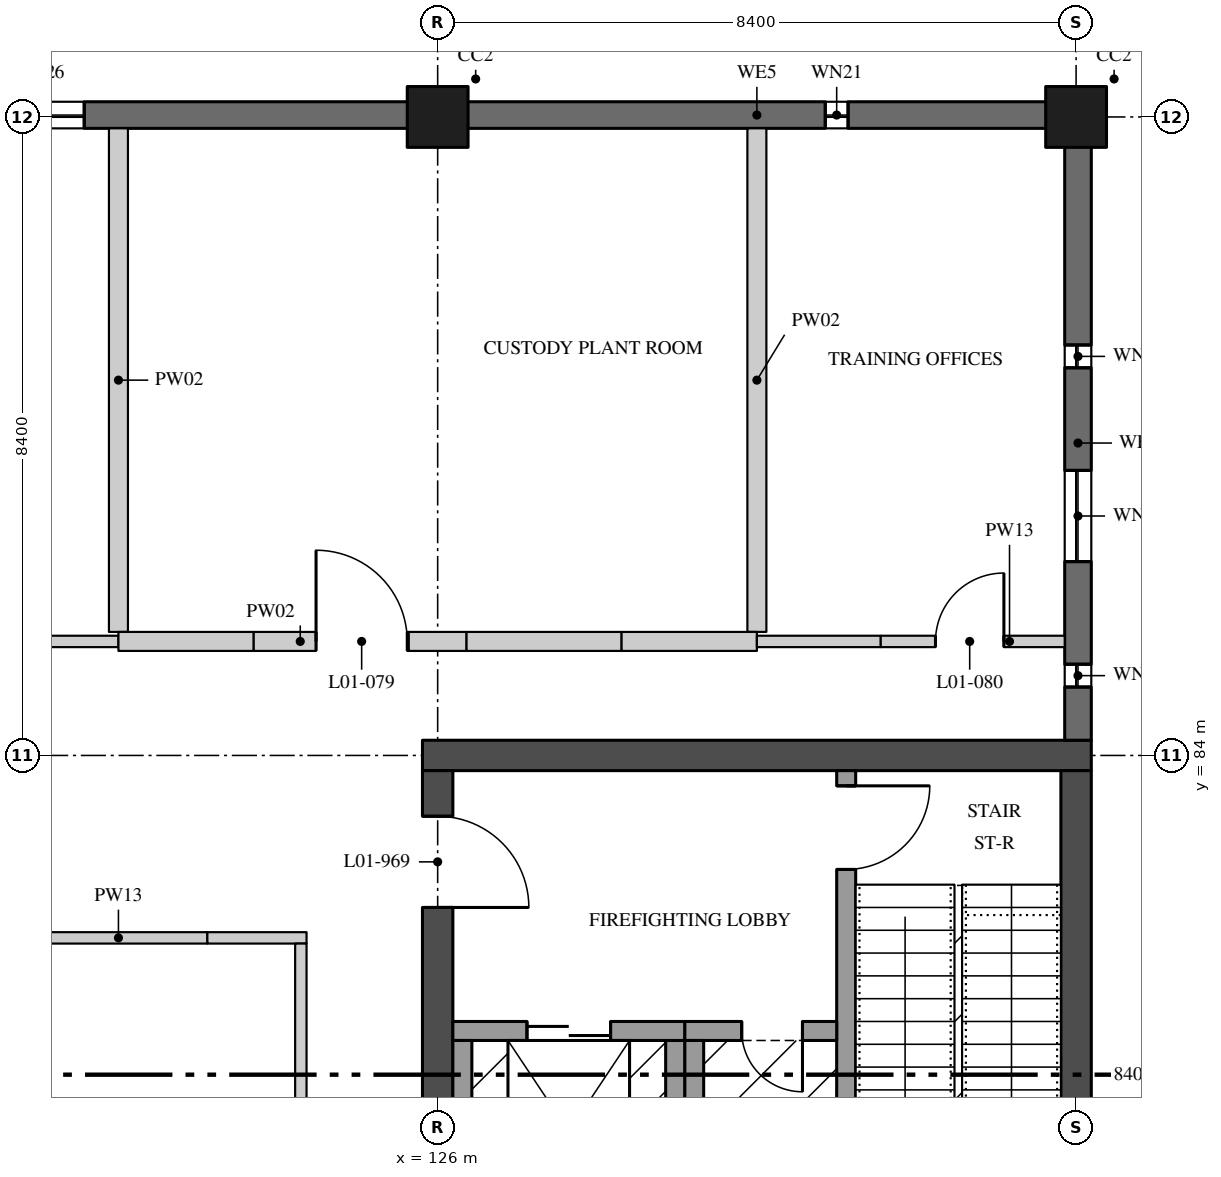
"""IFC4 building model, lengths in metres.
Left out: names, types, materials, properties, quantities, classifications, styles, units other than length and angle.
Written with IfcOpenShell. Run it as: python <this file> out.ifc"""

import sys

from ifc_helpers import new_model, si_unit, direction, frame, frame_2d, origin, origin_2d, place, context, subcontext, project, spatial, rectangle, extrude, element, fill, save


model = new_model("IFC4")
c1 = context("Model", 3, precision=1e-05, world=origin(), true_north=direction((0.0, 1.0)))
c2 = subcontext(c1, "Body", "Model", "MODEL_VIEW")
j1 = project(units=[si_unit("LENGTHUNIT", "METRE"), si_unit("PLANEANGLEUNIT", "RADIAN")], contexts=[c1])
p1 = place(None, origin())
s1 = spatial("IfcSite", under=j1, at=p1, CompositionType="ELEMENT")
p2 = place(p1, origin())
s2 = spatial("IfcBuilding", under=s1, at=p2, CompositionType="ELEMENT")
p3 = place(p2, frame((0.0, 0.0, 5.4)))
s3 = spatial("IfcBuildingStorey", under=s2, at=p3, CompositionType="ELEMENT", Elevation=5.4)
for number, where, z_axis, x_axis in (
    (1, (126.0, 92.4, 0.0), (0.0, 0.0, 1.0), (1.0, 0.0, 0.0)),
    (2, (134.4, 92.4, 0.0), (0.0, 0.0, 1.0), (1.0, 0.0, 0.0)),
):
    element("IfcColumn", number, at=place(p3, frame(where, z_axis=z_axis, x_axis=x_axis)), inside=s3, PredefinedType="COLUMN", context=c2, shape_type="SweptSolid", body=[
        extrude(rectangle(XDim=0.8, YDim=0.8, at=origin_2d()), origin(), (0.0, 0.0, 1.0), 4.37),
    ])
p4 = place(p3, frame((125.8, 84.0, 0.0), z_axis=(0.0, 0.0, 1.0), x_axis=(1.0, 0.0, 0.0)))
e3 = element("IfcWall", 3, at=p4, inside=s3, PredefinedType="SHEAR", context=c2, shape_type="SweptSolid", body=[
    extrude(rectangle(XDim=8.8, YDim=0.4, at=frame_2d((4.4, 0.0))), origin(), (0.0, 0.0, 1.0), 4.37),
])
p5 = place(p3, frame((126.0, 75.8, 0.0), z_axis=(0.0, 0.0, 1.0), x_axis=(0.0, 1.0, 0.0)))
e4 = element("IfcWall", 4, at=p5, inside=s3, PredefinedType="SHEAR", context=c2, shape_type="SweptSolid", body=[
    extrude(rectangle(XDim=8.0, YDim=0.4, at=frame_2d((4.0, 0.0))), origin(), (0.0, 0.0, 1.0), 4.37),
])
p6 = place(p5, frame((6.2, 0.0, 0.0)))
e5 = element("IfcOpeningElement", 5, at=p6, cuts=e4, PredefinedType="OPENING", context=c2, shape_type="SweptSolid", body=[
    extrude(rectangle(XDim=1.2, YDim=2.1, at=frame_2d((0.6, 1.05))), frame((0.0, 0.21, 0.0), z_axis=(0.0, -1.0, 0.0), x_axis=(1.0, 0.0, 0.0)), (0.0, 0.0, 1.0), 0.42),
])
p7 = place(p3, frame((134.4, 75.8, 0.0), z_axis=(0.0, 0.0, 1.0), x_axis=(0.0, 1.0, 0.0)))
e6 = element("IfcWall", 6, at=p7, inside=s3, PredefinedType="SHEAR", context=c2, shape_type="SweptSolid", body=[
    extrude(rectangle(XDim=8.0, YDim=0.4, at=frame_2d((4.0, 0.0))), origin(), (0.0, 0.0, 1.0), 4.37),
])
p8 = place(p3, frame((131.375, 83.8, 0.0), z_axis=(0.0, 0.0, 1.0), x_axis=(0.0, -1.0, 0.0)))
e7 = element("IfcWall", 7, at=p8, inside=s3, PredefinedType="SOLIDWALL", context=c2, shape_type="SweptSolid", body=[
    extrude(rectangle(XDim=8.0, YDim=0.25, at=frame_2d((4.0, 0.0))), origin(), (0.0, 0.0, 1.0), 4.37),
])
p9 = place(p8, frame((0.2, 0.0, 0.0)))
e8 = element("IfcOpeningElement", 8, at=p9, cuts=e7, PredefinedType="OPENING", context=c2, shape_type="SweptSolid", body=[
    extrude(rectangle(XDim=1.1, YDim=2.1, at=frame_2d((0.55, 1.05))), frame((0.0, 0.135, 0.0), z_axis=(0.0, -1.0, 0.0), x_axis=(1.0, 0.0, 0.0)), (0.0, 0.0, 1.0), 0.27),
])
p10 = place(p3, frame((131.25, 80.375, 0.0), z_axis=(0.0, 0.0, 1.0), x_axis=(-1.0, 0.0, 0.0)))
e9 = element("IfcWall", 9, at=p10, inside=s3, PredefinedType="SOLIDWALL", context=c2, shape_type="SweptSolid", body=[
    extrude(rectangle(XDim=2.0, YDim=0.25, at=frame_2d((1.0, 0.0))), origin(), (0.0, 0.0, 1.0), 4.37),
])
p11 = place(p10, frame((0.45, 0.0, 0.0)))
e10 = element("IfcOpeningElement", 10, at=p11, cuts=e9, PredefinedType="OPENING", context=c2, shape_type="SweptSolid", body=[
    extrude(rectangle(XDim=0.8, YDim=2.1, at=frame_2d((0.4, 1.05))), frame((0.0, 0.135, 0.0), z_axis=(0.0, -1.0, 0.0), x_axis=(1.0, 0.0, 0.0)), (0.0, 0.0, 1.0), 0.27),
])
p12 = place(p3, frame((129.375, 80.25, 0.0), z_axis=(0.0, 0.0, 1.0), x_axis=(0.0, -1.0, 0.0)))
e11 = element("IfcWall", 11, at=p12, inside=s3, PredefinedType="SOLIDWALL", context=c2, shape_type="SweptSolid", body=[
    extrude(rectangle(XDim=2.85, YDim=0.25, at=frame_2d((1.425, 0.0))), origin(), (0.0, 0.0, 1.0), 4.37),
])
p13 = place(p3, frame((129.125, 77.65, 0.0), z_axis=(0.0, 0.0, 1.0), x_axis=(0.0, 1.0, 0.0)))
e12 = element("IfcWall", 12, at=p13, inside=s3, PredefinedType="SOLIDWALL", context=c2, shape_type="SweptSolid", body=[
    extrude(rectangle(XDim=2.6, YDim=0.25, at=frame_2d((1.3, 0.0))), origin(), (0.0, 0.0, 1.0), 4.37),
])
p14 = place(p3, frame((126.2, 80.375, 0.0), z_axis=(0.0, 0.0, 1.0), x_axis=(1.0, 0.0, 0.0)))
e13 = element("IfcWall", 13, at=p14, inside=s3, PredefinedType="SOLIDWALL", context=c2, shape_type="SweptSolid", body=[
    extrude(rectangle(XDim=3.05, YDim=0.25, at=frame_2d((1.525, 0.0))), origin(), (0.0, 0.0, 1.0), 4.37),
])
p15 = place(p14, frame((0.975, 0.0, 0.0)))
e14 = element("IfcOpeningElement", 14, at=p15, cuts=e13, PredefinedType="OPENING", context=c2, shape_type="SweptSolid", body=[
    extrude(rectangle(XDim=1.1, YDim=2.1, at=frame_2d((0.55, 1.05))), frame((0.0, 0.135, 0.0), z_axis=(0.0, -1.0, 0.0), x_axis=(1.0, 0.0, 0.0)), (0.0, 0.0, 1.0), 0.27),
])
p16 = place(p3, frame((126.325, 77.65, 0.0), z_axis=(0.0, 0.0, 1.0), x_axis=(0.0, 1.0, 0.0)))
e15 = element("IfcWall", 15, at=p16, inside=s3, PredefinedType="SOLIDWALL", context=c2, shape_type="SweptSolid", body=[
    extrude(rectangle(XDim=2.6, YDim=0.25, at=frame_2d((1.3, 0.0))), origin(), (0.0, 0.0, 1.0), 4.37),
])
p17 = place(p3, frame((120.63, 81.6, 0.0), z_axis=(0.0, 0.0, 1.0), x_axis=(1.0, 0.0, 0.0)))
e16 = element("IfcWall", 16, at=p17, inside=s3, PredefinedType="PARTITIONING", context=c2, shape_type="SweptSolid", body=[
    extrude(rectangle(XDim=2.34, YDim=0.15, at=frame_2d((1.17, 0.0))), origin(), (0.0, 0.0, 1.0), 4.37),
])
p18 = place(p3, frame((122.97, 81.6, 0.0), z_axis=(0.0, 0.0, 1.0), x_axis=(1.0, 0.0, 0.0)))
e17 = element("IfcWall", 17, at=p18, inside=s3, PredefinedType="PARTITIONING", context=c2, shape_type="SweptSolid", body=[
    extrude(rectangle(XDim=1.305, YDim=0.15, at=frame_2d((0.652, 0.0))), origin(), (0.0, 0.0, 1.0), 3.895),
])
p19 = place(p3, frame((124.2, 76.135, 0.0), z_axis=(0.0, 0.0, 1.0), x_axis=(0.0, 1.0, 0.0)))
e18 = element("IfcWall", 18, at=p19, inside=s3, PredefinedType="PARTITIONING", context=c2, shape_type="SweptSolid", body=[
    extrude(rectangle(XDim=5.39, YDim=0.15, at=frame_2d((2.695, 0.0))), origin(), (0.0, 0.0, 1.0), 4.37),
])
p20 = place(p19, frame((2.04, 0.0, 0.0)))
e19 = element("IfcOpeningElement", 19, at=p20, cuts=e18, PredefinedType="OPENING", context=c2, shape_type="SweptSolid", body=[
    extrude(rectangle(XDim=0.9, YDim=2.1, at=frame_2d((0.45, 1.05))), frame((0.0, 0.085, 0.0), z_axis=(0.0, -1.0, 0.0), x_axis=(1.0, 0.0, 0.0)), (0.0, 0.0, 1.0), 0.17),
])
p21 = place(p3, frame((121.8, 85.625, 0.0), z_axis=(0.0, 0.0, 1.0), x_axis=(0.0, 1.0, 0.0)))
e20 = element("IfcWall", 20, at=p21, inside=s3, PredefinedType="PARTITIONING", context=c2, shape_type="SweptSolid", body=[
    extrude(rectangle(XDim=6.625, YDim=0.25, at=frame_2d((3.312, 0.0))), origin(), (0.0, 0.0, 1.0), 4.37),
])
p22 = place(p3, frame((120.17, 85.5, 0.0), z_axis=(0.0, 0.0, 1.0), x_axis=(1.0, 0.0, 0.0)))
e21 = element("IfcWall", 21, at=p22, inside=s3, PredefinedType="PARTITIONING", context=c2, shape_type="SweptSolid", body=[
    extrude(rectangle(XDim=1.63, YDim=0.15, at=frame_2d((0.815, 0.0))), origin(), (0.0, 0.0, 1.0), 3.895),
])
p23 = place(p3, frame((130.2, 85.625, 0.0), z_axis=(0.0, 0.0, 1.0), x_axis=(0.0, 1.0, 0.0)))
e22 = element("IfcWall", 22, at=p23, inside=s3, PredefinedType="PARTITIONING", context=c2, shape_type="SweptSolid", body=[
    extrude(rectangle(XDim=6.625, YDim=0.25, at=frame_2d((3.312, 0.0))), origin(), (0.0, 0.0, 1.0), 4.37),
])
p24 = place(p3, frame((121.8, 85.5, 0.0), z_axis=(0.0, 0.0, 1.0), x_axis=(1.0, 0.0, 0.0)))
e23 = element("IfcWall", 23, at=p24, inside=s3, PredefinedType="PARTITIONING", context=c2, shape_type="SweptSolid", body=[
    extrude(rectangle(XDim=1.78, YDim=0.25, at=frame_2d((0.89, 0.0))), origin(), (0.0, 0.0, 1.0), 3.895),
])
p25 = place(p3, frame((123.58, 85.5, 0.0), z_axis=(0.0, 0.0, 1.0), x_axis=(1.0, 0.0, 0.0)))
e24 = element("IfcWall", 24, at=p25, inside=s3, PredefinedType="PARTITIONING", context=c2, shape_type="SweptSolid", body=[
    extrude(rectangle(XDim=2.04, YDim=0.25, at=frame_2d((1.02, 0.0))), origin(), (0.0, 0.0, 1.0), 4.37),
])
p26 = place(p25, frame((0.82, 0.0, 0.0)))
e25 = element("IfcOpeningElement", 25, at=p26, cuts=e24, PredefinedType="OPENING", context=c2, shape_type="SweptSolid", body=[
    extrude(rectangle(XDim=1.2, YDim=2.4, at=frame_2d((0.6, 1.2))), frame((0.0, 0.135, 0.0), z_axis=(0.0, -1.0, 0.0), x_axis=(1.0, 0.0, 0.0)), (0.0, 0.0, 1.0), 0.27),
])
p27 = place(p3, frame((125.62, 85.5, 0.0), z_axis=(0.0, 0.0, 1.0), x_axis=(1.0, 0.0, 0.0)))
e26 = element("IfcWall", 26, at=p27, inside=s3, PredefinedType="PARTITIONING", context=c2, shape_type="SweptSolid", body=[
    extrude(rectangle(XDim=0.76, YDim=0.25, at=frame_2d((0.38, 0.0))), origin(), (0.0, 0.0, 1.0), 3.746),
])
p28 = place(p3, frame((126.38, 85.5, 0.0), z_axis=(0.0, 0.0, 1.0), x_axis=(1.0, 0.0, 0.0)))
e27 = element("IfcWall", 27, at=p28, inside=s3, PredefinedType="PARTITIONING", context=c2, shape_type="SweptSolid", body=[
    extrude(rectangle(XDim=2.04, YDim=0.25, at=frame_2d((1.02, 0.0))), origin(), (0.0, 0.0, 1.0), 4.37),
])
p29 = place(p3, frame((128.42, 85.5, 0.0), z_axis=(0.0, 0.0, 1.0), x_axis=(1.0, 0.0, 0.0)))
e28 = element("IfcWall", 28, at=p29, inside=s3, PredefinedType="PARTITIONING", context=c2, shape_type="SweptSolid", body=[
    extrude(rectangle(XDim=1.78, YDim=0.25, at=frame_2d((0.89, 0.0))), origin(), (0.0, 0.0, 1.0), 3.895),
])
p30 = place(p3, frame((130.2, 85.5, 0.0), z_axis=(0.0, 0.0, 1.0), x_axis=(1.0, 0.0, 0.0)))
e29 = element("IfcWall", 29, at=p30, inside=s3, PredefinedType="PARTITIONING", context=c2, shape_type="SweptSolid", body=[
    extrude(rectangle(XDim=1.63, YDim=0.15, at=frame_2d((0.815, 0.0))), origin(), (0.0, 0.0, 1.0), 3.895),
])
p31 = place(p3, frame((131.83, 85.5, 0.0), z_axis=(0.0, 0.0, 1.0), x_axis=(1.0, 0.0, 0.0)))
e30 = element("IfcWall", 30, at=p31, inside=s3, PredefinedType="PARTITIONING", context=c2, shape_type="SweptSolid", body=[
    extrude(rectangle(XDim=2.42, YDim=0.15, at=frame_2d((1.21, 0.0))), origin(), (0.0, 0.0, 1.0), 4.37),
])
p32 = place(p31, frame((0.72, 0.0, 0.0)))
e31 = element("IfcOpeningElement", 31, at=p32, cuts=e30, PredefinedType="OPENING", context=c2, shape_type="SweptSolid", body=[
    extrude(rectangle(XDim=0.9, YDim=2.1, at=frame_2d((0.45, 1.05))), frame((0.0, 0.085, 0.0), z_axis=(0.0, -1.0, 0.0), x_axis=(1.0, 0.0, 0.0)), (0.0, 0.0, 1.0), 0.17),
])
p33 = place(p3, frame((134.425, 84.2, 0.0), z_axis=(0.0, 0.0, 1.0), x_axis=(0.0, 1.0, 0.0)))
e32 = element("IfcWall", 32, at=p33, inside=s3, PredefinedType="SOLIDWALL", context=c2, shape_type="SweptSolid", body=[
    extrude(rectangle(XDim=7.82, YDim=0.35, at=frame_2d((3.91, 0.0))), origin(), (0.0, 0.0, 1.0), 3.746),
])
p34 = place(p33, frame((0.7, 0.0, 1.5)))
e33 = element("IfcOpeningElement", 33, at=p34, cuts=e32, PredefinedType="OPENING", context=c2, shape_type="SweptSolid", body=[
    extrude(rectangle(XDim=0.3, YDim=1.5, at=frame_2d((0.15, 0.75))), frame((0.0, 0.185, 0.0), z_axis=(0.0, -1.0, 0.0), x_axis=(1.0, 0.0, 0.0)), (0.0, 0.0, 1.0), 0.37),
])
p35 = place(p33, frame((2.35, 0.0, 1.5)))
e34 = element("IfcOpeningElement", 34, at=p35, cuts=e32, PredefinedType="OPENING", context=c2, shape_type="SweptSolid", body=[
    extrude(rectangle(XDim=1.2, YDim=1.65, at=frame_2d((0.6, 0.825))), frame((0.0, 0.185, 0.0), z_axis=(0.0, -1.0, 0.0), x_axis=(1.0, 0.0, 0.0)), (0.0, 0.0, 1.0), 0.37),
])
p36 = place(p33, frame((4.9, 0.0, 1.5)))
e35 = element("IfcOpeningElement", 35, at=p36, cuts=e32, PredefinedType="OPENING", context=c2, shape_type="SweptSolid", body=[
    extrude(rectangle(XDim=0.3, YDim=1.5, at=frame_2d((0.15, 0.75))), frame((0.0, 0.185, 0.0), z_axis=(0.0, -1.0, 0.0), x_axis=(1.0, 0.0, 0.0)), (0.0, 0.0, 1.0), 0.37),
])
p37 = place(p3, frame((134.02, 92.425, 0.0), z_axis=(0.0, 0.0, 1.0), x_axis=(-1.0, 0.0, 0.0)))
e36 = element("IfcWall", 36, at=p37, inside=s3, PredefinedType="SOLIDWALL", context=c2, shape_type="SweptSolid", body=[
    extrude(rectangle(XDim=7.64, YDim=0.35, at=frame_2d((3.82, 0.0))), origin(), (0.0, 0.0, 1.0), 3.746),
])
p38 = place(p37, frame((2.62, 0.0, 1.5)))
e37 = element("IfcOpeningElement", 37, at=p38, cuts=e36, PredefinedType="OPENING", context=c2, shape_type="SweptSolid", body=[
    extrude(rectangle(XDim=0.3, YDim=1.5, at=frame_2d((0.15, 0.75))), frame((0.0, 0.185, 0.0), z_axis=(0.0, -1.0, 0.0), x_axis=(1.0, 0.0, 0.0)), (0.0, 0.0, 1.0), 0.37),
])
p39 = place(p3, frame((125.62, 92.425, 0.0), z_axis=(0.0, 0.0, 1.0), x_axis=(-1.0, 0.0, 0.0)))
e38 = element("IfcWall", 38, at=p39, inside=s3, PredefinedType="SOLIDWALL", context=c2, shape_type="SweptSolid", body=[
    extrude(rectangle(XDim=7.64, YDim=0.35, at=frame_2d((3.82, 0.0))), origin(), (0.0, 0.0, 1.0), 3.746),
])
p40 = place(p39, frame((4.27, 0.0, 1.5)))
e39 = element("IfcOpeningElement", 39, at=p40, cuts=e38, PredefinedType="OPENING", context=c2, shape_type="SweptSolid", body=[
    extrude(rectangle(XDim=1.2, YDim=1.8, at=frame_2d((0.6, 0.9))), frame((0.0, 0.185, 0.0), z_axis=(0.0, -1.0, 0.0), x_axis=(1.0, 0.0, 0.0)), (0.0, 0.0, 1.0), 0.37),
])
p41 = place(p39, frame((6.82, 0.0, 1.5)))
e40 = element("IfcOpeningElement", 40, at=p41, cuts=e38, PredefinedType="OPENING", context=c2, shape_type="SweptSolid", body=[
    extrude(rectangle(XDim=0.3, YDim=1.5, at=frame_2d((0.15, 0.75))), frame((0.0, 0.185, 0.0), z_axis=(0.0, -1.0, 0.0), x_axis=(1.0, 0.0, 0.0)), (0.0, 0.0, 1.0), 0.37),
])
p42 = place(p6, frame((1.2, 0.0, 0.0), z_axis=(0.0, 0.0, 1.0), x_axis=(-1.0, 0.0, 0.0)))
e41 = element("IfcDoor", 41, at=p42, inside=s3, OperationType="SINGLE_SWING_LEFT", PredefinedType="DOOR", context=c2, shape_type="SweptSolid", body=[
    extrude(rectangle(XDim=1.2, YDim=2.1, at=frame_2d((0.6, 1.05))), frame((0.0, 0.035, 0.0), z_axis=(0.0, -1.0, 0.0), x_axis=(1.0, 0.0, 0.0)), (0.0, 0.0, 1.0), 0.07),
])
fill(e5, e41)
p43 = place(p11, origin())
e42 = element("IfcDoor", 42, at=p43, inside=s3, OperationType="SINGLE_SWING_RIGHT", PredefinedType="DOOR", context=c2, shape_type="SweptSolid", body=[
    extrude(rectangle(XDim=0.8, YDim=2.1, at=frame_2d((0.4, 1.05))), frame((0.0, 0.035, 0.0), z_axis=(0.0, -1.0, 0.0), x_axis=(1.0, 0.0, 0.0)), (0.0, 0.0, 1.0), 0.07),
])
fill(e10, e42)
p44 = place(p9, origin())
e43 = element("IfcDoor", 43, at=p44, inside=s3, OperationType="SINGLE_SWING_RIGHT", PredefinedType="DOOR", context=c2, shape_type="SweptSolid", body=[
    extrude(rectangle(XDim=1.1, YDim=2.1, at=frame_2d((0.55, 1.05))), frame((0.0, 0.035, 0.0), z_axis=(0.0, -1.0, 0.0), x_axis=(1.0, 0.0, 0.0)), (0.0, 0.0, 1.0), 0.07),
])
fill(e8, e43)
p45 = place(p15, origin())
e44 = element("IfcDoor", 44, at=p45, inside=s3, OperationType="DOUBLE_DOOR_SLIDING", PredefinedType="DOOR", context=c2, shape_type="SweptSolid", body=[
    extrude(rectangle(XDim=1.1, YDim=2.1, at=frame_2d((0.55, 1.05))), frame((0.0, 0.04, 0.0), z_axis=(0.0, -1.0, 0.0), x_axis=(1.0, 0.0, 0.0)), (0.0, 0.0, 1.0), 0.08),
])
fill(e14, e44)
p46 = place(p26, origin())
e45 = element("IfcDoor", 45, at=p46, inside=s3, OperationType="SINGLE_SWING_RIGHT", PredefinedType="DOOR", context=c2, shape_type="SweptSolid", body=[
    extrude(rectangle(XDim=1.2, YDim=2.4, at=frame_2d((0.6, 1.2))), frame((0.0, 0.05, 0.0), z_axis=(0.0, -1.0, 0.0), x_axis=(1.0, 0.0, 0.0)), (0.0, 0.0, 1.0), 0.1),
])
fill(e25, e45)
p47 = place(p32, origin())
e46 = element("IfcDoor", 46, at=p47, inside=s3, OperationType="SINGLE_SWING_LEFT", PredefinedType="DOOR", context=c2, shape_type="SweptSolid", body=[
    extrude(rectangle(XDim=0.9, YDim=2.1, at=frame_2d((0.45, 1.05))), frame((0.0, 0.025, 0.0), z_axis=(0.0, -1.0, 0.0), x_axis=(1.0, 0.0, 0.0)), (0.0, 0.0, 1.0), 0.05),
])
fill(e31, e46)
p48 = place(p34, origin())
e47 = element("IfcWindow", 47, at=p48, inside=s3, PartitioningType="SINGLE_PANEL", PredefinedType="WINDOW", context=c2, shape_type="SweptSolid", body=[
    extrude(rectangle(XDim=0.3, YDim=1.5, at=frame_2d((0.15, 0.75))), frame((0.0, 0.05, 0.0), z_axis=(0.0, -1.0, 0.0), x_axis=(1.0, 0.0, 0.0)), (0.0, 0.0, 1.0), 0.1),
])
fill(e33, e47)
p49 = place(p35, origin())
e48 = element("IfcWindow", 48, at=p49, inside=s3, PartitioningType="SINGLE_PANEL", PredefinedType="WINDOW", context=c2, shape_type="SweptSolid", body=[
    extrude(rectangle(XDim=1.2, YDim=1.65, at=frame_2d((0.6, 0.825))), frame((0.0, 0.04, 0.0), z_axis=(0.0, -1.0, 0.0), x_axis=(1.0, 0.0, 0.0)), (0.0, 0.0, 1.0), 0.08),
])
fill(e34, e48)
p50 = place(p36, origin())
e49 = element("IfcWindow", 49, at=p50, inside=s3, PartitioningType="SINGLE_PANEL", PredefinedType="WINDOW", context=c2, shape_type="SweptSolid", body=[
    extrude(rectangle(XDim=0.3, YDim=1.5, at=frame_2d((0.15, 0.75))), frame((0.0, 0.05, 0.0), z_axis=(0.0, -1.0, 0.0), x_axis=(1.0, 0.0, 0.0)), (0.0, 0.0, 1.0), 0.1),
])
fill(e35, e49)
p51 = place(p38, origin())
e50 = element("IfcWindow", 50, at=p51, inside=s3, PartitioningType="SINGLE_PANEL", PredefinedType="WINDOW", context=c2, shape_type="SweptSolid", body=[
    extrude(rectangle(XDim=0.3, YDim=1.5, at=frame_2d((0.15, 0.75))), frame((0.0, 0.05, 0.0), z_axis=(0.0, -1.0, 0.0), x_axis=(1.0, 0.0, 0.0)), (0.0, 0.0, 1.0), 0.1),
])
fill(e37, e50)
p52 = place(p40, origin())
e51 = element("IfcWindow", 51, at=p52, inside=s3, PartitioningType="SINGLE_PANEL", PredefinedType="WINDOW", context=c2, shape_type="SweptSolid", body=[
    extrude(rectangle(XDim=1.2, YDim=1.8, at=frame_2d((0.6, 0.9))), frame((0.0, 0.03, 0.0), z_axis=(0.0, -1.0, 0.0), x_axis=(1.0, 0.0, 0.0)), (0.0, 0.0, 1.0), 0.06),
])
fill(e39, e51)
save(model, sys.argv[1])
